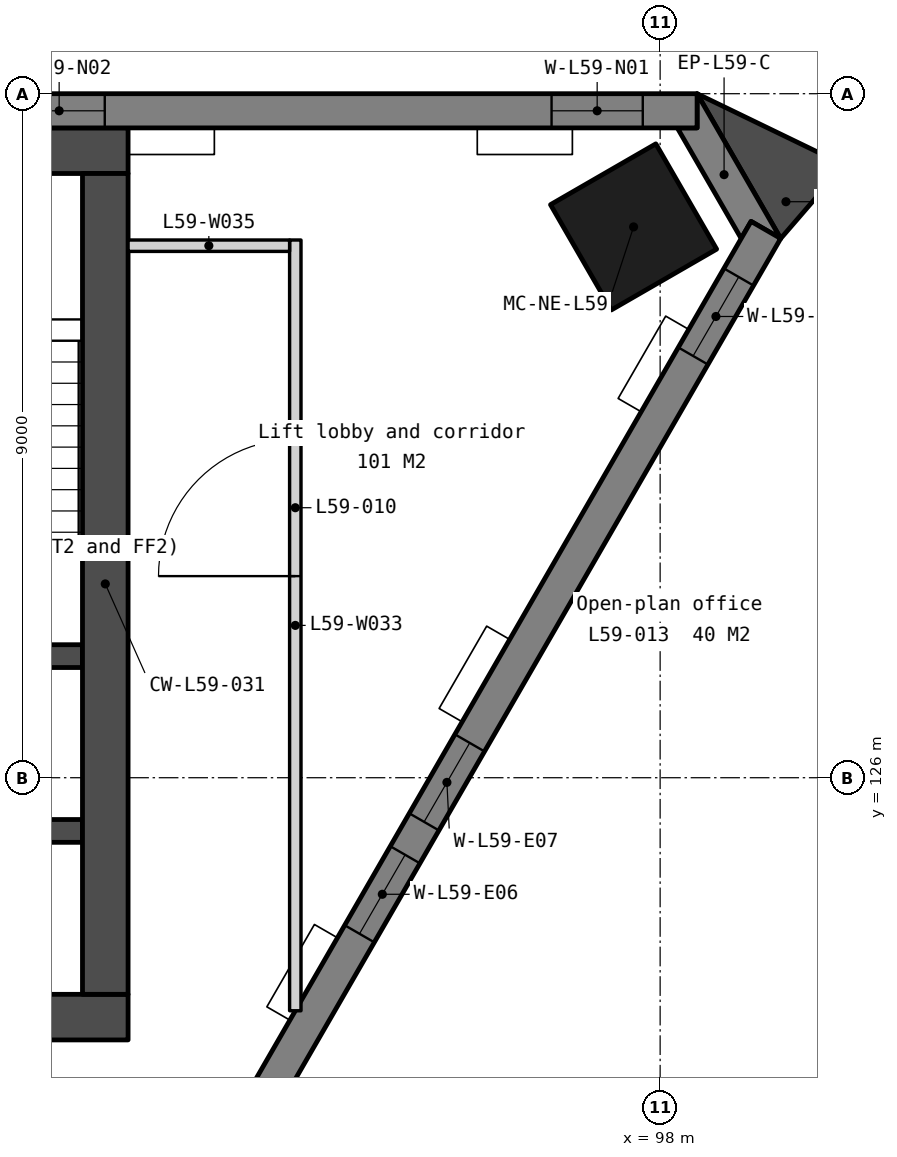
"""IFC4 building model, lengths in metres.
Left out: names, types, materials, properties, quantities, classifications, styles, units other than length and angle.
Written with IfcOpenShell. Run it as: python <this file> out.ifc"""

import sys

from ifc_helpers import new_model, si_unit, direction, frame, frame_2d, origin, origin_2d, place, context, subcontext, project, spatial, polyline, rectangle, outline, extrude, element, fill, save


model = new_model("IFC4")
c1 = context("Model", 3, precision=1e-05, world=origin(), true_north=direction((0.0, 1.0)))
c2 = subcontext(c1, "Body", "Model", "MODEL_VIEW")
j1 = project(units=[si_unit("LENGTHUNIT", "METRE"), si_unit("PLANEANGLEUNIT", "RADIAN")], contexts=[c1])
p1 = place(None, origin())
s1 = spatial("IfcSite", under=j1, at=p1, CompositionType="ELEMENT")
p2 = place(p1, origin())
s2 = spatial("IfcBuilding", under=s1, at=p2, CompositionType="ELEMENT")
p3 = place(p2, frame((0.0, 0.0, 242.6)))
s3 = spatial("IfcBuildingStorey", under=s2, at=p3, CompositionType="ELEMENT", Elevation=242.6)
p4 = place(p3, frame((97.651, 133.247, 0.0), z_axis=(0.0, 0.0, 1.0), x_axis=(-0.5, 0.866025403784, 0.0)))
e1 = element("IfcColumn", 1, at=p4, inside=s3, PredefinedType="COLUMN", context=c2, shape_type="SweptSolid", body=[
    extrude(rectangle(XDim=1.6, YDim=1.6, at=origin_2d()), origin(), (0.0, 0.0, 1.0), 3.9),
])
p5 = place(p3, frame((69.0, 134.25, 0.0), z_axis=(0.0, 0.0, 1.0), x_axis=(1.0, 0.0, 0.0)))
e2 = element("IfcWall", 2, at=p5, inside=s3, PredefinedType="SOLIDWALL", context=c2, shape_type="SweptSolid", body=[
    extrude(rectangle(XDim=22.0, YDim=0.6, at=frame_2d((11.0, 0.0))), origin(), (0.0, 0.0, 1.0), 3.75),
])
p6 = place(p3, frame((69.0, 122.85, 0.0), z_axis=(0.0, 0.0, 1.0), x_axis=(1.0, 0.0, 0.0)))
e3 = element("IfcWall", 3, at=p6, inside=s3, PredefinedType="SOLIDWALL", context=c2, shape_type="SweptSolid", body=[
    extrude(rectangle(XDim=22.0, YDim=0.6, at=frame_2d((11.0, 0.0))), origin(), (0.0, 0.0, 1.0), 3.75),
])
p7 = place(p6, frame((16.375, 0.0, 0.0)))
e4 = element("IfcOpeningElement", 4, at=p7, cuts=e3, PredefinedType="OPENING", context=c2, shape_type="SweptSolid", body=[
    extrude(rectangle(XDim=1.8, YDim=2.1, at=frame_2d((0.9, 1.05))), frame((0.0, 0.31, 0.0), z_axis=(0.0, -1.0, 0.0), x_axis=(1.0, 0.0, 0.0)), (0.0, 0.0, 1.0), 0.62),
])
p8 = place(p6, frame((3.825, 0.0, 0.0)))
e5 = element("IfcOpeningElement", 5, at=p8, cuts=e3, PredefinedType="OPENING", context=c2, shape_type="SweptSolid", body=[
    extrude(rectangle(XDim=1.8, YDim=2.1, at=frame_2d((0.9, 1.05))), frame((0.0, 0.31, 0.0), z_axis=(0.0, -1.0, 0.0), x_axis=(1.0, 0.0, 0.0)), (0.0, 0.0, 1.0), 0.62),
])
p9 = place(p6, frame((12.85, 0.0, 0.0)))
e6 = element("IfcOpeningElement", 6, at=p9, cuts=e3, PredefinedType="OPENING", context=c2, shape_type="SweptSolid", body=[
    extrude(rectangle(XDim=1.5, YDim=2.1, at=frame_2d((0.75, 1.05))), frame((0.0, 0.31, 0.0), z_axis=(0.0, -1.0, 0.0), x_axis=(1.0, 0.0, 0.0)), (0.0, 0.0, 1.0), 0.62),
])
for number, where, z_axis, x_axis in (
    (7, (87.85, 127.6, 0.0), (0.0, 0.0, 1.0), (1.0, 0.0, 0.0)),
    (8, (87.85, 125.3, 0.0), (0.0, 0.0, 1.0), (1.0, 0.0, 0.0)),
):
    element("IfcWall", number, at=place(p3, frame(where, z_axis=z_axis, x_axis=x_axis)), inside=s3, PredefinedType="SOLIDWALL", context=c2, shape_type="SweptSolid", body=[
        extrude(rectangle(XDim=2.55, YDim=0.3, at=frame_2d((1.275, 0.0))), origin(), (0.0, 0.0, 1.0), 3.75),
    ])
p10 = place(p3, frame((90.7, 133.95, 0.0), z_axis=(0.0, 0.0, 1.0), x_axis=(0.0, -1.0, 0.0)))
e9 = element("IfcWall", 9, at=p10, inside=s3, PredefinedType="SOLIDWALL", context=c2, shape_type="SweptSolid", body=[
    extrude(rectangle(XDim=10.8, YDim=0.6, at=frame_2d((5.4, 0.0))), origin(), (0.0, 0.0, 1.0), 3.75),
])
p11 = place(p3, frame((0.0, 0.0, -0.15)))
e10 = element("IfcWall", 10, at=p11, inside=s3, PredefinedType="SOLIDWALL", context=c2, shape_type="SweptSolid", body=[
    extrude(outline(polyline([(99.586, 133.095), (99.197, 133.32), (99.067, 133.095), (98.226, 134.55), (98.486, 134.55), (98.486, 135.0), (99.586, 133.095)])), origin(), (0.0, 0.0, 1.0), 3.9),
])
p12 = place(p3, frame((98.486, 134.775, -0.15), z_axis=(0.0, 0.0, 1.0), x_axis=(-1.0, 0.0, 0.0)))
e11 = element("IfcWall", 11, at=p12, inside=s3, PredefinedType="SOLIDWALL", context=c2, shape_type="SweptSolid", body=[
    extrude(outline(polyline([(36.972, 0.0), (36.972, 3.9), (0.0, 3.9), (0.0, 0.0), (36.972, 0.0)])), frame((0.0, 0.225, 0.0), z_axis=(0.0, -1.0, 0.0), x_axis=(1.0, 0.0, 0.0)), (0.0, 0.0, 1.0), 0.45),
])
p13 = place(p12, frame((0.715, 0.0, 0.95)))
e12 = element("IfcOpeningElement", 12, at=p13, cuts=e11, PredefinedType="OPENING", context=c2, shape_type="SweptSolid", body=[
    extrude(rectangle(XDim=1.2, YDim=2.2, at=frame_2d((0.6, 1.1))), frame((0.0, 0.235, 0.0), z_axis=(0.0, -1.0, 0.0), x_axis=(1.0, 0.0, 0.0)), (0.0, 0.0, 1.0), 0.47),
])
p14 = place(p12, frame((7.793, 0.0, 0.95)))
e13 = element("IfcOpeningElement", 13, at=p14, cuts=e11, PredefinedType="OPENING", context=c2, shape_type="SweptSolid", body=[
    extrude(rectangle(XDim=1.2, YDim=2.2, at=frame_2d((0.6, 1.1))), frame((0.0, 0.235, 0.0), z_axis=(0.0, -1.0, 0.0), x_axis=(1.0, 0.0, 0.0)), (0.0, 0.0, 1.0), 0.47),
])
p15 = place(p12, frame((9.493, 0.0, 0.95)))
e14 = element("IfcOpeningElement", 14, at=p15, cuts=e11, PredefinedType="OPENING", context=c2, shape_type="SweptSolid", body=[
    extrude(rectangle(XDim=1.2, YDim=2.2, at=frame_2d((0.6, 1.1))), frame((0.0, 0.235, 0.0), z_axis=(0.0, -1.0, 0.0), x_axis=(1.0, 0.0, 0.0)), (0.0, 0.0, 1.0), 0.47),
])
p16 = place(p12, frame((17.036, 0.0, 0.95)))
e15 = element("IfcOpeningElement", 15, at=p16, cuts=e11, PredefinedType="OPENING", context=c2, shape_type="SweptSolid", body=[
    extrude(rectangle(XDim=1.2, YDim=2.2, at=frame_2d((0.6, 1.1))), frame((0.0, 0.235, 0.0), z_axis=(0.0, -1.0, 0.0), x_axis=(1.0, 0.0, 0.0)), (0.0, 0.0, 1.0), 0.47),
])
p17 = place(p12, frame((18.736, 0.0, 0.95)))
e16 = element("IfcOpeningElement", 16, at=p17, cuts=e11, PredefinedType="OPENING", context=c2, shape_type="SweptSolid", body=[
    extrude(rectangle(XDim=1.2, YDim=2.2, at=frame_2d((0.6, 1.1))), frame((0.0, 0.235, 0.0), z_axis=(0.0, -1.0, 0.0), x_axis=(1.0, 0.0, 0.0)), (0.0, 0.0, 1.0), 0.47),
])
p18 = place(p12, frame((26.279, 0.0, 0.95)))
e17 = element("IfcOpeningElement", 17, at=p18, cuts=e11, PredefinedType="OPENING", context=c2, shape_type="SweptSolid", body=[
    extrude(rectangle(XDim=1.2, YDim=2.2, at=frame_2d((0.6, 1.1))), frame((0.0, 0.235, 0.0), z_axis=(0.0, -1.0, 0.0), x_axis=(1.0, 0.0, 0.0)), (0.0, 0.0, 1.0), 0.47),
])
p19 = place(p12, frame((27.979, 0.0, 0.95)))
e18 = element("IfcOpeningElement", 18, at=p19, cuts=e11, PredefinedType="OPENING", context=c2, shape_type="SweptSolid", body=[
    extrude(rectangle(XDim=1.2, YDim=2.2, at=frame_2d((0.6, 1.1))), frame((0.0, 0.235, 0.0), z_axis=(0.0, -1.0, 0.0), x_axis=(1.0, 0.0, 0.0)), (0.0, 0.0, 1.0), 0.47),
])
p20 = place(p12, frame((35.058, 0.0, 0.95)))
e19 = element("IfcOpeningElement", 19, at=p20, cuts=e11, PredefinedType="OPENING", context=c2, shape_type="SweptSolid", body=[
    extrude(rectangle(XDim=1.2, YDim=2.2, at=frame_2d((0.6, 1.1))), frame((0.0, 0.235, 0.0), z_axis=(0.0, -1.0, 0.0), x_axis=(1.0, 0.0, 0.0)), (0.0, 0.0, 1.0), 0.47),
])
p21 = place(p3, frame((80.905, 101.188, -0.15), z_axis=(0.0, 0.0, 1.0), x_axis=(0.500002536638, 0.866023939251, 0.0)))
e20 = element("IfcWall", 20, at=p21, inside=s3, PredefinedType="SOLIDWALL", context=c2, shape_type="SweptSolid", body=[
    extrude(outline(polyline([(36.972, 0.0), (36.972, 3.9), (0.0, 3.9), (0.0, 0.0), (36.972, 0.0)])), frame((0.0, 0.225, 0.0), z_axis=(0.0, -1.0, 0.0), x_axis=(1.0, 0.0, 0.0)), (0.0, 0.0, 1.0), 0.45),
])
p22 = place(p21, frame((0.715, 0.0, 0.95)))
e21 = element("IfcOpeningElement", 21, at=p22, cuts=e20, PredefinedType="OPENING", context=c2, shape_type="SweptSolid", body=[
    extrude(rectangle(XDim=1.2, YDim=2.2, at=frame_2d((0.6, 1.1))), frame((0.0, 0.235, 0.0), z_axis=(0.0, -1.0, 0.0), x_axis=(1.0, 0.0, 0.0)), (0.0, 0.0, 1.0), 0.47),
])
p23 = place(p21, frame((7.793, 0.0, 0.95)))
e22 = element("IfcOpeningElement", 22, at=p23, cuts=e20, PredefinedType="OPENING", context=c2, shape_type="SweptSolid", body=[
    extrude(rectangle(XDim=1.2, YDim=2.2, at=frame_2d((0.6, 1.1))), frame((0.0, 0.235, 0.0), z_axis=(0.0, -1.0, 0.0), x_axis=(1.0, 0.0, 0.0)), (0.0, 0.0, 1.0), 0.47),
])
p24 = place(p21, frame((9.493, 0.0, 0.95)))
e23 = element("IfcOpeningElement", 23, at=p24, cuts=e20, PredefinedType="OPENING", context=c2, shape_type="SweptSolid", body=[
    extrude(rectangle(XDim=1.2, YDim=2.2, at=frame_2d((0.6, 1.1))), frame((0.0, 0.235, 0.0), z_axis=(0.0, -1.0, 0.0), x_axis=(1.0, 0.0, 0.0)), (0.0, 0.0, 1.0), 0.47),
])
p25 = place(p21, frame((17.036, 0.0, 0.95)))
e24 = element("IfcOpeningElement", 24, at=p25, cuts=e20, PredefinedType="OPENING", context=c2, shape_type="SweptSolid", body=[
    extrude(rectangle(XDim=1.2, YDim=2.2, at=frame_2d((0.6, 1.1))), frame((0.0, 0.235, 0.0), z_axis=(0.0, -1.0, 0.0), x_axis=(1.0, 0.0, 0.0)), (0.0, 0.0, 1.0), 0.47),
])
p26 = place(p21, frame((18.736, 0.0, 0.95)))
e25 = element("IfcOpeningElement", 25, at=p26, cuts=e20, PredefinedType="OPENING", context=c2, shape_type="SweptSolid", body=[
    extrude(rectangle(XDim=1.2, YDim=2.2, at=frame_2d((0.6, 1.1))), frame((0.0, 0.235, 0.0), z_axis=(0.0, -1.0, 0.0), x_axis=(1.0, 0.0, 0.0)), (0.0, 0.0, 1.0), 0.47),
])
p27 = place(p21, frame((26.279, 0.0, 0.95)))
e26 = element("IfcOpeningElement", 26, at=p27, cuts=e20, PredefinedType="OPENING", context=c2, shape_type="SweptSolid", body=[
    extrude(rectangle(XDim=1.2, YDim=2.2, at=frame_2d((0.6, 1.1))), frame((0.0, 0.235, 0.0), z_axis=(0.0, -1.0, 0.0), x_axis=(1.0, 0.0, 0.0)), (0.0, 0.0, 1.0), 0.47),
])
p28 = place(p21, frame((27.979, 0.0, 0.95)))
e27 = element("IfcOpeningElement", 27, at=p28, cuts=e20, PredefinedType="OPENING", context=c2, shape_type="SweptSolid", body=[
    extrude(rectangle(XDim=1.2, YDim=2.2, at=frame_2d((0.6, 1.1))), frame((0.0, 0.235, 0.0), z_axis=(0.0, -1.0, 0.0), x_axis=(1.0, 0.0, 0.0)), (0.0, 0.0, 1.0), 0.47),
])
p29 = place(p21, frame((35.058, 0.0, 0.95)))
e28 = element("IfcOpeningElement", 28, at=p29, cuts=e20, PredefinedType="OPENING", context=c2, shape_type="SweptSolid", body=[
    extrude(rectangle(XDim=1.2, YDim=2.2, at=frame_2d((0.6, 1.1))), frame((0.0, 0.235, 0.0), z_axis=(0.0, -1.0, 0.0), x_axis=(1.0, 0.0, 0.0)), (0.0, 0.0, 1.0), 0.47),
])
p30 = place(p3, frame((0.0, 0.0, -0.15)))
e29 = element("IfcWall", 29, at=p30, inside=s3, PredefinedType="SOLIDWALL", context=c2, shape_type="SweptSolid", body=[
    extrude(outline(polyline([(99.586, 133.095), (100.422, 134.063), (98.486, 135.0), (99.586, 133.095)])), origin(), (0.0, 0.0, 1.0), 3.9),
])
p31 = place(p3, frame((93.2, 122.934, 0.0), z_axis=(0.0, 0.0, 1.0), x_axis=(0.0, 1.0, 0.0)))
e30 = element("IfcWall", 30, at=p31, inside=s3, PredefinedType="PARTITIONING", context=c2, shape_type="SweptSolid", body=[
    extrude(rectangle(XDim=10.141, YDim=0.15, at=frame_2d((5.071, 0.0))), origin(), (0.0, 0.0, 1.0), 3.75),
])
p32 = place(p31, frame((5.719, 0.0, 0.0)))
e31 = element("IfcOpeningElement", 31, at=p32, cuts=e30, PredefinedType="OPENING", context=c2, shape_type="SweptSolid", body=[
    extrude(rectangle(XDim=1.8, YDim=2.1, at=frame_2d((0.9, 1.05))), frame((0.0, 0.085, 0.0), z_axis=(0.0, -1.0, 0.0), x_axis=(1.0, 0.0, 0.0)), (0.0, 0.0, 1.0), 0.17),
])
p33 = place(p3, frame((91.0, 133.0, 0.0), z_axis=(0.0, 0.0, 1.0), x_axis=(1.0, 0.0, 0.0)))
e32 = element("IfcWall", 32, at=p33, inside=s3, PredefinedType="PARTITIONING", context=c2, shape_type="SweptSolid", body=[
    extrude(rectangle(XDim=2.125, YDim=0.15, at=frame_2d((1.062, 0.0))), origin(), (0.0, 0.0, 1.0), 3.75),
])
p34 = place(p13, origin())
e33 = element("IfcWindow", 33, at=p34, inside=s3, PartitioningType="SINGLE_PANEL", PredefinedType="WINDOW", context=c2, shape_type="SweptSolid", body=[
    extrude(rectangle(XDim=1.2, YDim=2.2, at=frame_2d((0.6, 1.1))), frame((0.0, 0.03, 0.0), z_axis=(0.0, -1.0, 0.0), x_axis=(1.0, 0.0, 0.0)), (0.0, 0.0, 1.0), 0.06),
])
fill(e12, e33)
p35 = place(p14, origin())
e34 = element("IfcWindow", 34, at=p35, inside=s3, PartitioningType="SINGLE_PANEL", PredefinedType="WINDOW", context=c2, shape_type="SweptSolid", body=[
    extrude(rectangle(XDim=1.2, YDim=2.2, at=frame_2d((0.6, 1.1))), frame((0.0, 0.03, 0.0), z_axis=(0.0, -1.0, 0.0), x_axis=(1.0, 0.0, 0.0)), (0.0, 0.0, 1.0), 0.06),
])
fill(e13, e34)
p36 = place(p27, origin())
e35 = element("IfcWindow", 35, at=p36, inside=s3, PartitioningType="SINGLE_PANEL", PredefinedType="WINDOW", context=c2, shape_type="SweptSolid", body=[
    extrude(rectangle(XDim=1.2, YDim=2.2, at=frame_2d((0.6, 1.1))), frame((0.0, 0.03, 0.0), z_axis=(0.0, -1.0, 0.0), x_axis=(1.0, 0.0, 0.0)), (0.0, 0.0, 1.0), 0.06),
])
fill(e26, e35)
p37 = place(p28, origin())
e36 = element("IfcWindow", 36, at=p37, inside=s3, PartitioningType="SINGLE_PANEL", PredefinedType="WINDOW", context=c2, shape_type="SweptSolid", body=[
    extrude(rectangle(XDim=1.2, YDim=2.2, at=frame_2d((0.6, 1.1))), frame((0.0, 0.03, 0.0), z_axis=(0.0, -1.0, 0.0), x_axis=(1.0, 0.0, 0.0)), (0.0, 0.0, 1.0), 0.06),
])
fill(e27, e36)
p38 = place(p29, origin())
e37 = element("IfcWindow", 37, at=p38, inside=s3, PartitioningType="SINGLE_PANEL", PredefinedType="WINDOW", context=c2, shape_type="SweptSolid", body=[
    extrude(rectangle(XDim=1.2, YDim=2.2, at=frame_2d((0.6, 1.1))), frame((0.0, 0.03, 0.0), z_axis=(0.0, -1.0, 0.0), x_axis=(1.0, 0.0, 0.0)), (0.0, 0.0, 1.0), 0.06),
])
fill(e28, e37)
p39 = place(p32, origin())
e38 = element("IfcDoor", 38, at=p39, inside=s3, OperationType="SINGLE_SWING_LEFT", PredefinedType="DOOR", context=c2, shape_type="SweptSolid", body=[
    extrude(rectangle(XDim=1.8, YDim=2.1, at=frame_2d((0.9, 1.05))), frame((0.0, 0.025, 0.0), z_axis=(0.0, -1.0, 0.0), x_axis=(1.0, 0.0, 0.0)), (0.0, 0.0, 1.0), 0.05),
])
fill(e31, e38)
save(model, sys.argv[1])
